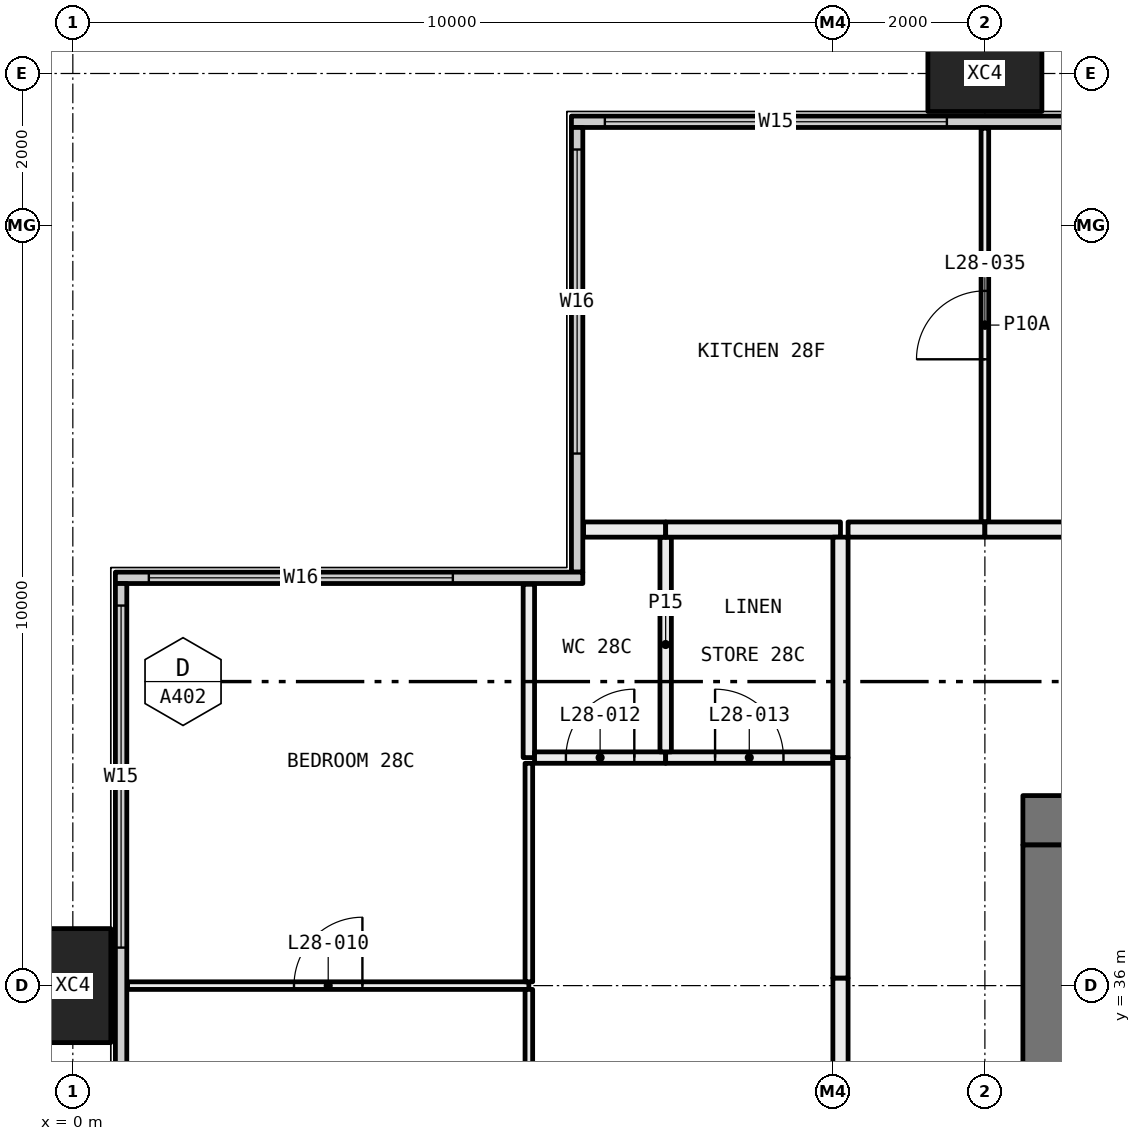
"""IFC4 building model, lengths in metres.
Left out: names, types, materials, properties, quantities, classifications, styles, units other than length and angle.
Written with IfcOpenShell. Run it as: python <this file> out.ifc"""

import sys

from ifc_helpers import new_model, si_unit, direction, frame, frame_2d, origin, origin_2d, place, context, subcontext, project, spatial, rectangle, hollow_rectangle, extrude, element, fill, save


model = new_model("IFC4")
c1 = context("Model", 3, precision=1e-05, world=origin(), true_north=direction((0.0, 1.0)))
c2 = subcontext(c1, "Body", "Model", "MODEL_VIEW")
j1 = project(units=[si_unit("LENGTHUNIT", "METRE"), si_unit("PLANEANGLEUNIT", "RADIAN")], contexts=[c1])
p1 = place(None, origin())
s1 = spatial("IfcSite", under=j1, at=p1, CompositionType="ELEMENT")
p2 = place(p1, origin())
s2 = spatial("IfcBuilding", under=s1, at=p2, CompositionType="ELEMENT")
p3 = place(p2, frame((0.0, 0.0, 110.4)))
s3 = spatial("IfcBuildingStorey", under=s2, at=p3, CompositionType="ELEMENT", Elevation=110.4)
for number, where, z_axis, x_axis in (
    (1, (0.0, 36.0, -0.4), (0.0, 0.0, 1.0), (0.0, 1.0, 0.0)),
    (2, (12.0, 48.0, -0.4), (0.0, 0.0, 1.0), (1.0, 0.0, 0.0)),
):
    element("IfcColumn", number, at=place(p3, frame(where, z_axis=z_axis, x_axis=x_axis)), inside=s3, PredefinedType="COLUMN", context=c2, shape_type="SweptSolid", body=[
        extrude(hollow_rectangle(XDim=1.5, YDim=1.0, WallThickness=0.06, at=origin_2d()), origin(), (0.0, 0.0, 1.0), 3.45),
    ])
p4 = place(p3, frame((6.56, 47.365, 0.0), z_axis=(0.0, 0.0, 1.0), x_axis=(1.0, 0.0, 0.0)))
e3 = element("IfcWall", 3, at=p4, inside=s3, PredefinedType="ELEMENTEDWALL", context=c2, shape_type="SweptSolid", body=[
    extrude(rectangle(XDim=58.88, YDim=0.15, at=frame_2d((29.44, 0.0))), origin(), (0.0, 0.0, 1.0), 3.05),
])
p5 = place(p4, frame((0.44, 0.0, 0.45)))
e4 = element("IfcOpeningElement", 4, at=p5, cuts=e3, PredefinedType="OPENING", context=c2, shape_type="SweptSolid", body=[
    extrude(rectangle(XDim=4.5, YDim=2.55, at=frame_2d((2.25, 1.275))), frame((0.0, 0.085, 0.0), z_axis=(0.0, -1.0, 0.0), x_axis=(1.0, 0.0, 0.0)), (0.0, 0.0, 1.0), 0.17),
])
p6 = place(p4, frame((7.94, 0.0, 0.45)))
e5 = element("IfcOpeningElement", 5, at=p6, cuts=e3, PredefinedType="OPENING", context=c2, shape_type="SweptSolid", body=[
    extrude(rectangle(XDim=3.0, YDim=2.55, at=frame_2d((1.5, 1.275))), frame((0.0, 0.085, 0.0), z_axis=(0.0, -1.0, 0.0), x_axis=(1.0, 0.0, 0.0)), (0.0, 0.0, 1.0), 0.17),
])
p7 = place(p4, frame((11.94, 0.0, 0.45)))
e6 = element("IfcOpeningElement", 6, at=p7, cuts=e3, PredefinedType="OPENING", context=c2, shape_type="SweptSolid", body=[
    extrude(rectangle(XDim=3.0, YDim=2.55, at=frame_2d((1.5, 1.275))), frame((0.0, 0.085, 0.0), z_axis=(0.0, -1.0, 0.0), x_axis=(1.0, 0.0, 0.0)), (0.0, 0.0, 1.0), 0.17),
])
p8 = place(p4, frame((19.94, 0.0, 0.45)))
e7 = element("IfcOpeningElement", 7, at=p8, cuts=e3, PredefinedType="OPENING", context=c2, shape_type="SweptSolid", body=[
    extrude(rectangle(XDim=3.0, YDim=2.55, at=frame_2d((1.5, 1.275))), frame((0.0, 0.085, 0.0), z_axis=(0.0, -1.0, 0.0), x_axis=(1.0, 0.0, 0.0)), (0.0, 0.0, 1.0), 0.17),
])
p9 = place(p4, frame((23.94, 0.0, 0.45)))
e8 = element("IfcOpeningElement", 8, at=p9, cuts=e3, PredefinedType="OPENING", context=c2, shape_type="SweptSolid", body=[
    extrude(rectangle(XDim=2.0, YDim=2.55, at=frame_2d((1.0, 1.275))), frame((0.0, 0.085, 0.0), z_axis=(0.0, -1.0, 0.0), x_axis=(1.0, 0.0, 0.0)), (0.0, 0.0, 1.0), 0.17),
])
p10 = place(p4, frame((31.94, 0.0, 0.45)))
e9 = element("IfcOpeningElement", 9, at=p10, cuts=e3, PredefinedType="OPENING", context=c2, shape_type="SweptSolid", body=[
    extrude(rectangle(XDim=3.0, YDim=2.55, at=frame_2d((1.5, 1.275))), frame((0.0, 0.085, 0.0), z_axis=(0.0, -1.0, 0.0), x_axis=(1.0, 0.0, 0.0)), (0.0, 0.0, 1.0), 0.17),
])
p11 = place(p4, frame((35.94, 0.0, 0.45)))
e10 = element("IfcOpeningElement", 10, at=p11, cuts=e3, PredefinedType="OPENING", context=c2, shape_type="SweptSolid", body=[
    extrude(rectangle(XDim=3.0, YDim=2.55, at=frame_2d((1.5, 1.275))), frame((0.0, 0.085, 0.0), z_axis=(0.0, -1.0, 0.0), x_axis=(1.0, 0.0, 0.0)), (0.0, 0.0, 1.0), 0.17),
])
p12 = place(p4, frame((43.94, 0.0, 0.45)))
e11 = element("IfcOpeningElement", 11, at=p12, cuts=e3, PredefinedType="OPENING", context=c2, shape_type="SweptSolid", body=[
    extrude(rectangle(XDim=3.0, YDim=2.55, at=frame_2d((1.5, 1.275))), frame((0.0, 0.085, 0.0), z_axis=(0.0, -1.0, 0.0), x_axis=(1.0, 0.0, 0.0)), (0.0, 0.0, 1.0), 0.17),
])
p13 = place(p4, frame((47.94, 0.0, 0.45)))
e12 = element("IfcOpeningElement", 12, at=p13, cuts=e3, PredefinedType="OPENING", context=c2, shape_type="SweptSolid", body=[
    extrude(rectangle(XDim=2.0, YDim=2.55, at=frame_2d((1.0, 1.275))), frame((0.0, 0.085, 0.0), z_axis=(0.0, -1.0, 0.0), x_axis=(1.0, 0.0, 0.0)), (0.0, 0.0, 1.0), 0.17),
])
p14 = place(p4, frame((53.94, 0.0, 0.45)))
e13 = element("IfcOpeningElement", 13, at=p14, cuts=e3, PredefinedType="OPENING", context=c2, shape_type="SweptSolid", body=[
    extrude(rectangle(XDim=4.5, YDim=2.55, at=frame_2d((2.25, 1.275))), frame((0.0, 0.085, 0.0), z_axis=(0.0, -1.0, 0.0), x_axis=(1.0, 0.0, 0.0)), (0.0, 0.0, 1.0), 0.17),
])
p15 = place(p3, frame((6.635, 41.44, 0.0), z_axis=(0.0, 0.0, 1.0), x_axis=(0.0, 1.0, 0.0)))
e14 = element("IfcWall", 14, at=p15, inside=s3, PredefinedType="ELEMENTEDWALL", context=c2, shape_type="SweptSolid", body=[
    extrude(rectangle(XDim=5.85, YDim=0.15, at=frame_2d((2.925, 0.0))), origin(), (0.0, 0.0, 1.0), 3.05),
])
p16 = place(p15, frame((1.56, 0.0, 0.45)))
e15 = element("IfcOpeningElement", 15, at=p16, cuts=e14, PredefinedType="OPENING", context=c2, shape_type="SweptSolid", body=[
    extrude(rectangle(XDim=4.0, YDim=2.55, at=frame_2d((2.0, 1.275))), frame((0.0, 0.085, 0.0), z_axis=(0.0, -1.0, 0.0), x_axis=(1.0, 0.0, 0.0)), (0.0, 0.0, 1.0), 0.17),
])
p17 = place(p3, frame((0.56, 41.365, 0.0), z_axis=(0.0, 0.0, 1.0), x_axis=(1.0, 0.0, 0.0)))
e16 = element("IfcWall", 16, at=p17, inside=s3, PredefinedType="ELEMENTEDWALL", context=c2, shape_type="SweptSolid", body=[
    extrude(rectangle(XDim=6.15, YDim=0.15, at=frame_2d((3.075, 0.0))), origin(), (0.0, 0.0, 1.0), 3.05),
])
p18 = place(p17, frame((0.44, 0.0, 0.45)))
e17 = element("IfcOpeningElement", 17, at=p18, cuts=e16, PredefinedType="OPENING", context=c2, shape_type="SweptSolid", body=[
    extrude(rectangle(XDim=4.0, YDim=2.55, at=frame_2d((2.0, 1.275))), frame((0.0, 0.085, 0.0), z_axis=(0.0, -1.0, 0.0), x_axis=(1.0, 0.0, 0.0)), (0.0, 0.0, 1.0), 0.17),
])
p19 = place(p3, frame((0.635, 18.71, 0.0), z_axis=(0.0, 0.0, 1.0), x_axis=(0.0, 1.0, 0.0)))
e18 = element("IfcWall", 18, at=p19, inside=s3, PredefinedType="ELEMENTEDWALL", context=c2, shape_type="SweptSolid", body=[
    extrude(rectangle(XDim=22.58, YDim=0.15, at=frame_2d((11.29, 0.0))), origin(), (0.0, 0.0, 1.0), 3.05),
])
p20 = place(p19, frame((0.29, 0.0, 0.45)))
e19 = element("IfcOpeningElement", 19, at=p20, cuts=e18, PredefinedType="OPENING", context=c2, shape_type="SweptSolid", body=[
    extrude(rectangle(XDim=4.5, YDim=2.55, at=frame_2d((2.25, 1.275))), frame((0.0, 0.085, 0.0), z_axis=(0.0, -1.0, 0.0), x_axis=(1.0, 0.0, 0.0)), (0.0, 0.0, 1.0), 0.17),
])
p21 = place(p19, frame((7.79, 0.0, 0.45)))
e20 = element("IfcOpeningElement", 20, at=p21, cuts=e18, PredefinedType="OPENING", context=c2, shape_type="SweptSolid", body=[
    extrude(rectangle(XDim=3.0, YDim=2.55, at=frame_2d((1.5, 1.275))), frame((0.0, 0.085, 0.0), z_axis=(0.0, -1.0, 0.0), x_axis=(1.0, 0.0, 0.0)), (0.0, 0.0, 1.0), 0.17),
])
p22 = place(p19, frame((11.79, 0.0, 0.45)))
e21 = element("IfcOpeningElement", 21, at=p22, cuts=e18, PredefinedType="OPENING", context=c2, shape_type="SweptSolid", body=[
    extrude(rectangle(XDim=2.0, YDim=2.55, at=frame_2d((1.0, 1.275))), frame((0.0, 0.085, 0.0), z_axis=(0.0, -1.0, 0.0), x_axis=(1.0, 0.0, 0.0)), (0.0, 0.0, 1.0), 0.17),
])
p23 = place(p19, frame((17.79, 0.0, 0.45)))
e22 = element("IfcOpeningElement", 22, at=p23, cuts=e18, PredefinedType="OPENING", context=c2, shape_type="SweptSolid", body=[
    extrude(rectangle(XDim=4.5, YDim=2.55, at=frame_2d((2.25, 1.275))), frame((0.0, 0.085, 0.0), z_axis=(0.0, -1.0, 0.0), x_axis=(1.0, 0.0, 0.0)), (0.0, 0.0, 1.0), 0.17),
])
p24 = place(p3, frame((6.0, 36.0, 0.0), z_axis=(0.0, 0.0, 1.0), x_axis=(-1.0, 0.0, 0.0)))
e23 = element("IfcWall", 23, at=p24, inside=s3, PredefinedType="PARTITIONING", context=c2, shape_type="SweptSolid", body=[
    extrude(rectangle(XDim=5.28, YDim=0.1, at=frame_2d((2.64, 0.0))), origin(), (0.0, 0.0, 1.0), 2.45),
])
p25 = place(p24, frame((2.19, 0.0, 0.0)))
e24 = element("IfcOpeningElement", 24, at=p25, cuts=e23, PredefinedType="OPENING", context=c2, shape_type="SweptSolid", body=[
    extrude(rectangle(XDim=0.9, YDim=2.1, at=frame_2d((0.45, 1.05))), frame((0.0, 0.06, 0.0), z_axis=(0.0, -1.0, 0.0), x_axis=(1.0, 0.0, 0.0)), (0.0, 0.0, 1.0), 0.12),
])
p26 = place(p3, frame((6.0, 25.5, 0.0), z_axis=(0.0, 0.0, 1.0), x_axis=(0.0, 1.0, 0.0)))
e25 = element("IfcWall", 25, at=p26, inside=s3, PredefinedType="PARTITIONING", context=c2, shape_type="SweptSolid", body=[
    extrude(rectangle(XDim=10.45, YDim=0.1, at=frame_2d((5.225, 0.0))), origin(), (0.0, 0.0, 1.0), 2.45),
])
p27 = place(p3, frame((6.0, 36.05, 0.0), z_axis=(0.0, 0.0, 1.0), x_axis=(0.0, 1.0, 0.0)))
e26 = element("IfcWall", 26, at=p27, inside=s3, PredefinedType="PARTITIONING", context=c2, shape_type="SweptSolid", body=[
    extrude(rectangle(XDim=2.875, YDim=0.1, at=frame_2d((1.438, 0.0))), origin(), (0.0, 0.0, 1.0), 2.45),
])
p28 = place(p3, frame((6.0, 39.0, 0.0), z_axis=(0.0, 0.0, 1.0), x_axis=(0.0, 1.0, 0.0)))
e27 = element("IfcWall", 27, at=p28, inside=s3, PredefinedType="PARTITIONING", context=c2, shape_type="SweptSolid", body=[
    extrude(rectangle(XDim=2.28, YDim=0.15, at=frame_2d((1.14, 0.0))), origin(), (0.0, 0.0, 1.0), 3.05),
])
p29 = place(p3, frame((7.8, 39.0, 0.0), z_axis=(0.0, 0.0, 1.0), x_axis=(-1.0, 0.0, 0.0)))
e28 = element("IfcWall", 28, at=p29, inside=s3, PredefinedType="PARTITIONING", context=c2, shape_type="SweptSolid", body=[
    extrude(rectangle(XDim=1.725, YDim=0.15, at=frame_2d((0.863, 0.0))), origin(), (0.0, 0.0, 1.0), 3.05),
])
p30 = place(p29, frame((0.413, 0.0, 0.0)))
e29 = element("IfcOpeningElement", 29, at=p30, cuts=e28, PredefinedType="OPENING", context=c2, shape_type="SweptSolid", body=[
    extrude(rectangle(XDim=0.9, YDim=2.1, at=frame_2d((0.45, 1.05))), frame((0.0, 0.085, 0.0), z_axis=(0.0, -1.0, 0.0), x_axis=(1.0, 0.0, 0.0)), (0.0, 0.0, 1.0), 0.17),
])
p31 = place(p3, frame((10.0, 39.0, 0.0), z_axis=(0.0, 0.0, 1.0), x_axis=(-1.0, 0.0, 0.0)))
e30 = element("IfcWall", 30, at=p31, inside=s3, PredefinedType="PARTITIONING", context=c2, shape_type="SweptSolid", body=[
    extrude(rectangle(XDim=2.2, YDim=0.15, at=frame_2d((1.1, 0.0))), origin(), (0.0, 0.0, 1.0), 3.05),
])
p32 = place(p31, frame((0.65, 0.0, 0.0)))
e31 = element("IfcOpeningElement", 31, at=p32, cuts=e30, PredefinedType="OPENING", context=c2, shape_type="SweptSolid", body=[
    extrude(rectangle(XDim=0.9, YDim=2.1, at=frame_2d((0.45, 1.05))), frame((0.0, 0.085, 0.0), z_axis=(0.0, -1.0, 0.0), x_axis=(1.0, 0.0, 0.0)), (0.0, 0.0, 1.0), 0.17),
])
p33 = place(p3, frame((10.1, 25.5, 0.0), z_axis=(0.0, 0.0, 1.0), x_axis=(0.0, 1.0, 0.0)))
e32 = element("IfcWall", 32, at=p33, inside=s3, PredefinedType="PARTITIONING", context=c2, shape_type="SweptSolid", body=[
    extrude(rectangle(XDim=10.6, YDim=0.2, at=frame_2d((5.3, 0.0))), origin(), (0.0, 0.0, 1.0), 2.45),
])
p34 = place(p3, frame((10.1, 36.1, 0.0), z_axis=(0.0, 0.0, 1.0), x_axis=(0.0, 1.0, 0.0)))
e33 = element("IfcWall", 33, at=p34, inside=s3, PredefinedType="PARTITIONING", context=c2, shape_type="SweptSolid", body=[
    extrude(rectangle(XDim=2.9, YDim=0.2, at=frame_2d((1.45, 0.0))), origin(), (0.0, 0.0, 1.0), 3.05),
])
p35 = place(p3, frame((7.8, 39.075, 0.0), z_axis=(0.0, 0.0, 1.0), x_axis=(0.0, 1.0, 0.0)))
e34 = element("IfcWall", 34, at=p35, inside=s3, PredefinedType="PARTITIONING", context=c2, shape_type="SweptSolid", body=[
    extrude(rectangle(XDim=2.825, YDim=0.15, at=frame_2d((1.413, 0.0))), origin(), (0.0, 0.0, 1.0), 3.05),
])
p36 = place(p3, frame((7.8, 42.0, 0.0), z_axis=(0.0, 0.0, 1.0), x_axis=(-1.0, 0.0, 0.0)))
e35 = element("IfcWall", 35, at=p36, inside=s3, PredefinedType="PARTITIONING", context=c2, shape_type="SweptSolid", body=[
    extrude(rectangle(XDim=1.08, YDim=0.2, at=frame_2d((0.54, 0.0))), origin(), (0.0, 0.0, 1.0), 3.05),
])
p37 = place(p3, frame((10.1, 42.0, 0.0), z_axis=(0.0, 0.0, 1.0), x_axis=(-1.0, 0.0, 0.0)))
e36 = element("IfcWall", 36, at=p37, inside=s3, PredefinedType="PARTITIONING", context=c2, shape_type="SweptSolid", body=[
    extrude(rectangle(XDim=2.3, YDim=0.2, at=frame_2d((1.15, 0.0))), origin(), (0.0, 0.0, 1.0), 3.05),
])
p38 = place(p3, frame((10.1, 39.0, 0.0), z_axis=(0.0, 0.0, 1.0), x_axis=(0.0, 1.0, 0.0)))
e37 = element("IfcWall", 37, at=p38, inside=s3, PredefinedType="PARTITIONING", context=c2, shape_type="SweptSolid", body=[
    extrude(rectangle(XDim=2.9, YDim=0.2, at=frame_2d((1.45, 0.0))), origin(), (0.0, 0.0, 1.0), 3.05),
])
p39 = place(p3, frame((12.0, 42.1, 0.0), z_axis=(0.0, 0.0, 1.0), x_axis=(0.0, 1.0, 0.0)))
e38 = element("IfcWall", 38, at=p39, inside=s3, PredefinedType="PARTITIONING", context=c2, shape_type="SweptSolid", body=[
    extrude(rectangle(XDim=5.18, YDim=0.1, at=frame_2d((2.59, 0.0))), origin(), (0.0, 0.0, 1.0), 3.05),
])
p40 = place(p39, frame((2.14, 0.0, 0.0)))
e39 = element("IfcOpeningElement", 39, at=p40, cuts=e38, PredefinedType="OPENING", context=c2, shape_type="SweptSolid", body=[
    extrude(rectangle(XDim=0.9, YDim=2.1, at=frame_2d((0.45, 1.05))), frame((0.0, 0.06, 0.0), z_axis=(0.0, -1.0, 0.0), x_axis=(1.0, 0.0, 0.0)), (0.0, 0.0, 1.0), 0.12),
])
p41 = place(p3, frame((10.2, 42.0, 0.0), z_axis=(0.0, 0.0, 1.0), x_axis=(1.0, 0.0, 0.0)))
e40 = element("IfcWall", 40, at=p41, inside=s3, PredefinedType="PARTITIONING", context=c2, shape_type="SweptSolid", body=[
    extrude(rectangle(XDim=1.8, YDim=0.2, at=frame_2d((0.9, 0.0))), origin(), (0.0, 0.0, 1.0), 3.05),
])
p42 = place(p3, frame((12.0, 42.0, 0.0), z_axis=(0.0, 0.0, 1.0), x_axis=(1.0, 0.0, 0.0)))
e41 = element("IfcWall", 41, at=p42, inside=s3, PredefinedType="PARTITIONING", context=c2, shape_type="SweptSolid", body=[
    extrude(rectangle(XDim=6.0, YDim=0.2, at=frame_2d((3.0, 0.0))), origin(), (0.0, 0.0, 1.0), 3.05),
])
p43 = place(p42, frame((2.5, 0.0, 0.0)))
e42 = element("IfcOpeningElement", 42, at=p43, cuts=e41, PredefinedType="OPENING", context=c2, shape_type="SweptSolid", body=[
    extrude(rectangle(XDim=1.0, YDim=2.1, at=frame_2d((0.5, 1.05))), frame((0.0, 0.11, 0.0), z_axis=(0.0, -1.0, 0.0), x_axis=(1.0, 0.0, 0.0)), (0.0, 0.0, 1.0), 0.22),
])
p44 = place(p3, frame((12.5, 38.175, 0.0), z_axis=(0.0, 0.0, 1.0), x_axis=(1.0, 0.0, 0.0)))
e43 = element("IfcWall", 43, at=p44, inside=s3, PredefinedType="SHEAR", context=c2, shape_type="SweptSolid", body=[
    extrude(rectangle(XDim=11.0, YDim=0.65, at=frame_2d((5.5, 0.0))), origin(), (0.0, 0.0, 1.0), 3.05),
])
p45 = place(p44, frame((8.475, 0.0, 0.0)))
e44 = element("IfcOpeningElement", 44, at=p45, cuts=e43, PredefinedType="OPENING", context=c2, shape_type="SweptSolid", body=[
    extrude(rectangle(XDim=1.6, YDim=2.1, at=frame_2d((0.8, 1.05))), frame((0.0, 0.335, 0.0), z_axis=(0.0, -1.0, 0.0), x_axis=(1.0, 0.0, 0.0)), (0.0, 0.0, 1.0), 0.67),
])
p46 = place(p3, frame((12.825, 22.15, 0.0), z_axis=(0.0, 0.0, 1.0), x_axis=(0.0, 1.0, 0.0)))
e45 = element("IfcWall", 45, at=p46, inside=s3, PredefinedType="SHEAR", context=c2, shape_type="SweptSolid", body=[
    extrude(rectangle(XDim=15.7, YDim=0.65, at=frame_2d((7.85, 0.0))), origin(), (0.0, 0.0, 1.0), 3.05),
])
p47 = place(p46, frame((8.3, 0.0, 0.0)))
e46 = element("IfcOpeningElement", 46, at=p47, cuts=e45, PredefinedType="OPENING", context=c2, shape_type="SweptSolid", body=[
    extrude(rectangle(XDim=1.6, YDim=2.1, at=frame_2d((0.8, 1.05))), frame((0.0, 0.335, 0.0), z_axis=(0.0, -1.0, 0.0), x_axis=(1.0, 0.0, 0.0)), (0.0, 0.0, 1.0), 0.67),
])
p48 = place(p46, frame((2.125, 0.0, 0.0)))
e47 = element("IfcOpeningElement", 47, at=p48, cuts=e45, PredefinedType="OPENING", context=c2, shape_type="SweptSolid", body=[
    extrude(rectangle(XDim=1.0, YDim=2.1, at=frame_2d((0.5, 1.05))), frame((0.0, 0.335, 0.0), z_axis=(0.0, -1.0, 0.0), x_axis=(1.0, 0.0, 0.0)), (0.0, 0.0, 1.0), 0.67),
])
p49 = place(p5, origin())
e48 = element("IfcWindow", 48, at=p49, inside=s3, PartitioningType="SINGLE_PANEL", PredefinedType="WINDOW", context=c2, shape_type="SweptSolid", body=[
    extrude(rectangle(XDim=4.5, YDim=2.55, at=frame_2d((2.25, 1.275))), frame((0.0, 0.03, 0.0), z_axis=(0.0, -1.0, 0.0), x_axis=(1.0, 0.0, 0.0)), (0.0, 0.0, 1.0), 0.06),
])
fill(e4, e48)
p50 = place(p16, origin())
e49 = element("IfcWindow", 49, at=p50, inside=s3, PartitioningType="SINGLE_PANEL", PredefinedType="WINDOW", context=c2, shape_type="SweptSolid", body=[
    extrude(rectangle(XDim=4.0, YDim=2.55, at=frame_2d((2.0, 1.275))), frame((0.0, 0.03, 0.0), z_axis=(0.0, -1.0, 0.0), x_axis=(1.0, 0.0, 0.0)), (0.0, 0.0, 1.0), 0.06),
])
fill(e15, e49)
p51 = place(p18, origin())
e50 = element("IfcWindow", 50, at=p51, inside=s3, PartitioningType="SINGLE_PANEL", PredefinedType="WINDOW", context=c2, shape_type="SweptSolid", body=[
    extrude(rectangle(XDim=4.0, YDim=2.55, at=frame_2d((2.0, 1.275))), frame((0.0, 0.03, 0.0), z_axis=(0.0, -1.0, 0.0), x_axis=(1.0, 0.0, 0.0)), (0.0, 0.0, 1.0), 0.06),
])
fill(e17, e50)
p52 = place(p23, origin())
e51 = element("IfcWindow", 51, at=p52, inside=s3, PartitioningType="SINGLE_PANEL", PredefinedType="WINDOW", context=c2, shape_type="SweptSolid", body=[
    extrude(rectangle(XDim=4.5, YDim=2.55, at=frame_2d((2.25, 1.275))), frame((0.0, 0.03, 0.0), z_axis=(0.0, -1.0, 0.0), x_axis=(1.0, 0.0, 0.0)), (0.0, 0.0, 1.0), 0.06),
])
fill(e22, e51)
p53 = place(p25, frame((0.9, 0.0, 0.0), x_axis=(-1.0, 0.0, 0.0)))
e52 = element("IfcDoor", 52, at=p53, inside=s3, OperationType="SINGLE_SWING_LEFT", PredefinedType="DOOR", context=c2, shape_type="SweptSolid", body=[
    extrude(rectangle(XDim=0.9, YDim=2.1, at=frame_2d((0.45, 1.05))), frame((0.0, 0.025, 0.0), z_axis=(0.0, -1.0, 0.0), x_axis=(1.0, 0.0, 0.0)), (0.0, 0.0, 1.0), 0.05),
])
fill(e24, e52)
p54 = place(p30, frame((0.9, 0.0, 0.0), x_axis=(-1.0, 0.0, 0.0)))
e53 = element("IfcDoor", 53, at=p54, inside=s3, OperationType="SINGLE_SWING_LEFT", PredefinedType="DOOR", context=c2, shape_type="SweptSolid", body=[
    extrude(rectangle(XDim=0.9, YDim=2.1, at=frame_2d((0.45, 1.05))), frame((0.0, 0.025, 0.0), z_axis=(0.0, -1.0, 0.0), x_axis=(1.0, 0.0, 0.0)), (0.0, 0.0, 1.0), 0.05),
])
fill(e29, e53)
p55 = place(p32, frame((0.9, 0.0, 0.0), x_axis=(-1.0, 0.0, 0.0)))
e54 = element("IfcDoor", 54, at=p55, inside=s3, OperationType="SINGLE_SWING_RIGHT", PredefinedType="DOOR", context=c2, shape_type="SweptSolid", body=[
    extrude(rectangle(XDim=0.9, YDim=2.1, at=frame_2d((0.45, 1.05))), frame((0.0, 0.025, 0.0), z_axis=(0.0, -1.0, 0.0), x_axis=(1.0, 0.0, 0.0)), (0.0, 0.0, 1.0), 0.05),
])
fill(e31, e54)
p56 = place(p40, origin())
e55 = element("IfcDoor", 55, at=p56, inside=s3, OperationType="SINGLE_SWING_RIGHT", PredefinedType="DOOR", context=c2, shape_type="SweptSolid", body=[
    extrude(rectangle(XDim=0.9, YDim=2.1, at=frame_2d((0.45, 1.05))), frame((0.0, 0.025, 0.0), z_axis=(0.0, -1.0, 0.0), x_axis=(1.0, 0.0, 0.0)), (0.0, 0.0, 1.0), 0.05),
])
fill(e39, e55)
save(model, sys.argv[1])
